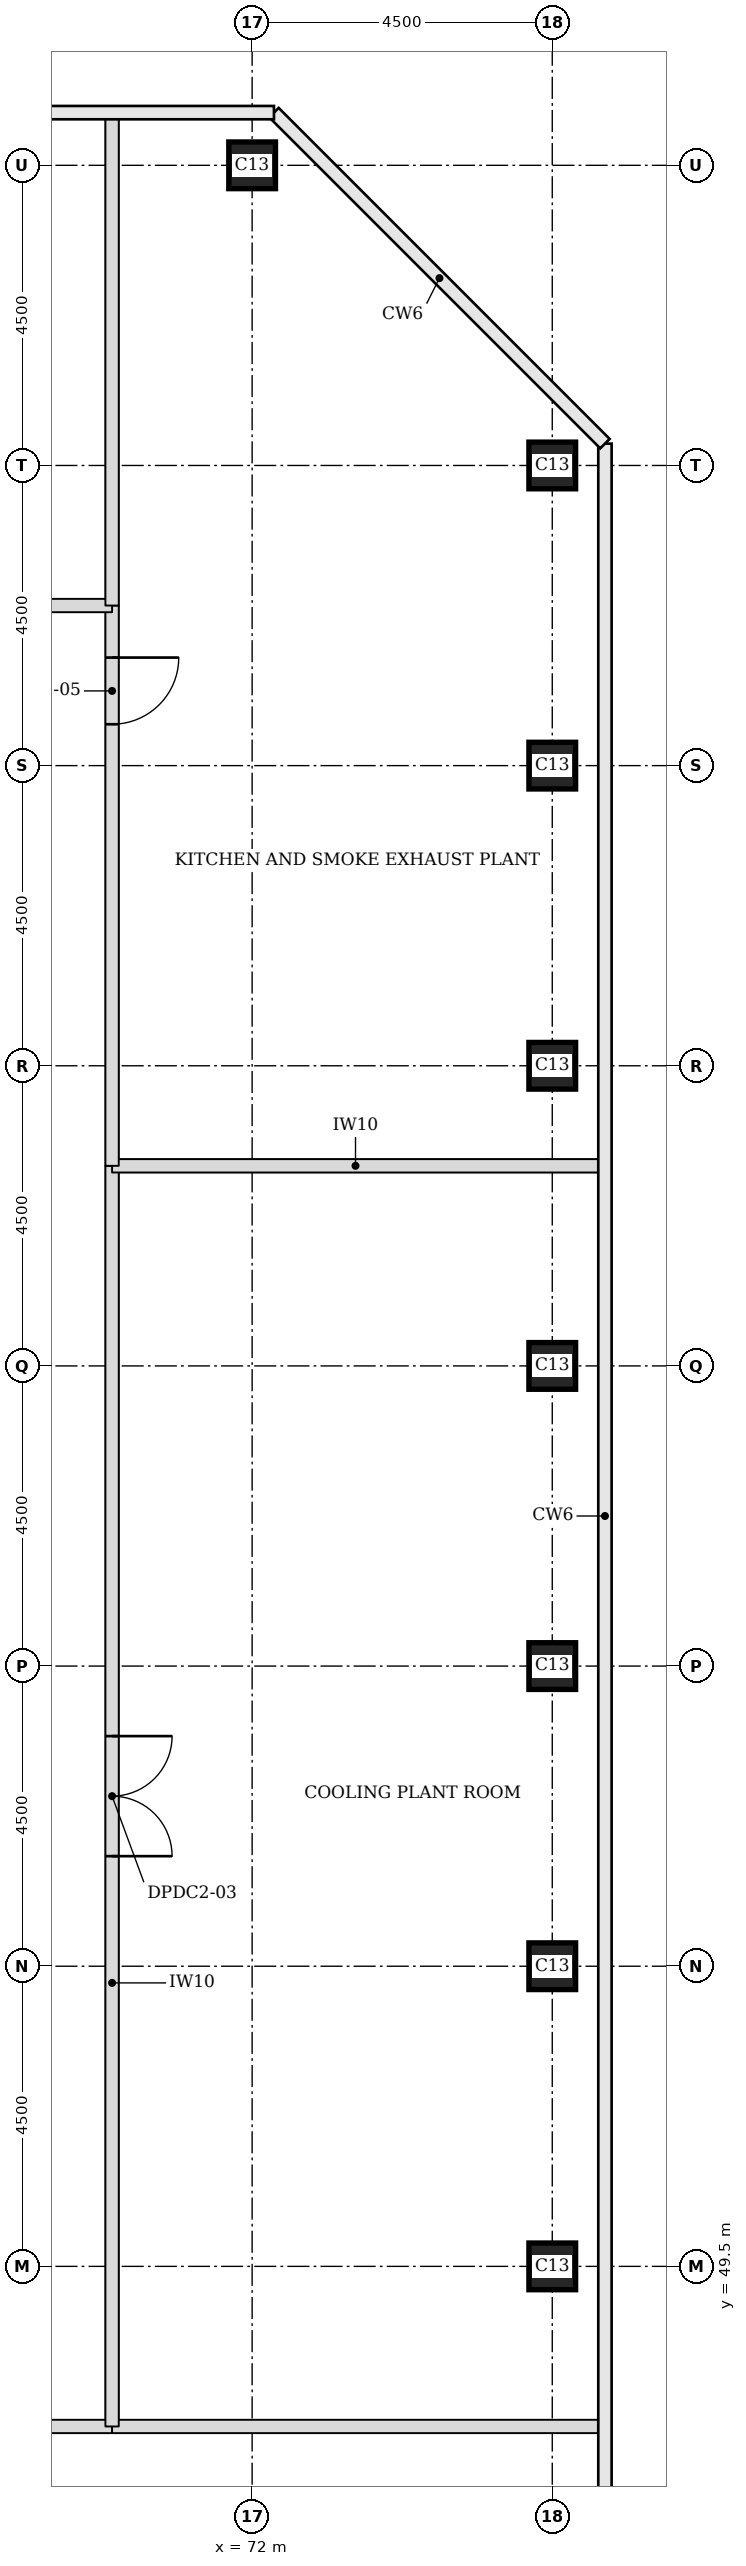
"""IFC4 building model, lengths in metres.
Left out: names, types, materials, properties, quantities, classifications, styles, units other than length and angle.
Written with IfcOpenShell. Run it as: python <this file> out.ifc"""

import sys

from ifc_helpers import new_model, si_unit, direction, frame, frame_2d, origin, origin_2d, place, context, subcontext, project, spatial, rectangle, extrude, element, fill, save


model = new_model("IFC4")
c1 = context("Model", 3, precision=1e-05, world=origin(), true_north=direction((0.0, 1.0)))
c2 = subcontext(c1, "Body", "Model", "MODEL_VIEW")
j1 = project(units=[si_unit("LENGTHUNIT", "METRE"), si_unit("PLANEANGLEUNIT", "RADIAN")], contexts=[c1])
p1 = place(None, origin())
s1 = spatial("IfcSite", under=j1, at=p1, CompositionType="ELEMENT")
p2 = place(p1, origin())
s2 = spatial("IfcBuilding", under=s1, at=p2, CompositionType="ELEMENT")
p3 = place(p2, frame((0.0, 0.0, 268.7)))
s3 = spatial("IfcBuildingStorey", under=s2, at=p3, CompositionType="ELEMENT", Elevation=268.7)
for number, where, z_axis, x_axis in (
    (1, (76.5, 49.5, 0.0), (0.0, 0.0, 1.0), (1.0, 0.0, 0.0)),
    (2, (76.5, 54.0, 0.0), (0.0, 0.0, 1.0), (1.0, 0.0, 0.0)),
    (3, (76.5, 58.5, 0.0), (0.0, 0.0, 1.0), (1.0, 0.0, 0.0)),
    (4, (76.5, 63.0, 0.0), (0.0, 0.0, 1.0), (1.0, 0.0, 0.0)),
    (5, (76.5, 67.5, 0.0), (0.0, 0.0, 1.0), (1.0, 0.0, 0.0)),
    (6, (76.5, 72.0, 0.0), (0.0, 0.0, 1.0), (1.0, 0.0, 0.0)),
    (7, (76.5, 76.5, 0.0), (0.0, 0.0, 1.0), (1.0, 0.0, 0.0)),
    (8, (72.0, 81.0, 0.0), (0.0, 0.0, 1.0), (1.0, 0.0, 0.0)),
):
    element("IfcColumn", number, at=place(p3, frame(where, z_axis=z_axis, x_axis=x_axis)), inside=s3, PredefinedType="COLUMN", context=c2, shape_type="SweptSolid", body=[
        extrude(rectangle(XDim=0.7, YDim=0.7, at=origin_2d()), origin(), (0.0, 0.0, 1.0), 5.0),
    ])
p4 = place(p3, frame((42.6, 47.1, 0.0), z_axis=(0.0, 0.0, 1.0), x_axis=(1.0, 0.0, 0.0)))
e9 = element("IfcWall", 9, at=p4, inside=s3, PredefinedType="PARTITIONING", context=c2, shape_type="SweptSolid", body=[
    extrude(rectangle(XDim=27.3, YDim=0.2, at=frame_2d((13.65, 0.0))), origin(), (0.0, 0.0, 1.0), 4.75),
])
p5 = place(p4, frame((12.75, 0.0, 0.0)))
e10 = element("IfcOpeningElement", 10, at=p5, cuts=e9, PredefinedType="OPENING", context=c2, shape_type="SweptSolid", body=[
    extrude(rectangle(XDim=1.8, YDim=2.1, at=frame_2d((0.9, 1.05))), frame((0.0, 0.11, 0.0), z_axis=(0.0, -1.0, 0.0), x_axis=(1.0, 0.0, 0.0)), (0.0, 0.0, 1.0), 0.22),
])
p6 = place(p3, frame((69.9, 47.1, 0.0), z_axis=(0.0, 0.0, 1.0), x_axis=(1.0, 0.0, 0.0)))
e11 = element("IfcWall", 11, at=p6, inside=s3, PredefinedType="PARTITIONING", context=c2, shape_type="SweptSolid", body=[
    extrude(rectangle(XDim=7.3, YDim=0.2, at=frame_2d((3.65, 0.0))), origin(), (0.0, 0.0, 1.0), 4.75),
])
p7 = place(p3, frame((69.9, 47.1, 0.0), z_axis=(0.0, 0.0, 1.0), x_axis=(0.0, 1.0, 0.0)))
e12 = element("IfcWall", 12, at=p7, inside=s3, PredefinedType="PARTITIONING", context=c2, shape_type="SweptSolid", body=[
    extrude(rectangle(XDim=18.9, YDim=0.2, at=frame_2d((9.45, 0.0))), origin(), (0.0, 0.0, 1.0), 4.75),
])
p8 = place(p7, frame((8.55, 0.0, 0.0)))
e13 = element("IfcOpeningElement", 13, at=p8, cuts=e12, PredefinedType="OPENING", context=c2, shape_type="SweptSolid", body=[
    extrude(rectangle(XDim=1.8, YDim=2.1, at=frame_2d((0.9, 1.05))), frame((0.0, 0.11, 0.0), z_axis=(0.0, -1.0, 0.0), x_axis=(1.0, 0.0, 0.0)), (0.0, 0.0, 1.0), 0.22),
])
p9 = place(p3, frame((69.9, 66.0, 0.0), z_axis=(0.0, 0.0, 1.0), x_axis=(1.0, 0.0, 0.0)))
e14 = element("IfcWall", 14, at=p9, inside=s3, PredefinedType="PARTITIONING", context=c2, shape_type="SweptSolid", body=[
    extrude(rectangle(XDim=7.3, YDim=0.2, at=frame_2d((3.65, 0.0))), origin(), (0.0, 0.0, 1.0), 4.75),
])
p10 = place(p3, frame((69.9, 66.0, 0.0), z_axis=(0.0, 0.0, 1.0), x_axis=(0.0, 1.0, 0.0)))
e15 = element("IfcWall", 15, at=p10, inside=s3, PredefinedType="PARTITIONING", context=c2, shape_type="SweptSolid", body=[
    extrude(rectangle(XDim=8.4, YDim=0.2, at=frame_2d((4.2, 0.0))), origin(), (0.0, 0.0, 1.0), 4.75),
])
p11 = place(p10, frame((6.62, 0.0, 0.0)))
e16 = element("IfcOpeningElement", 16, at=p11, cuts=e15, PredefinedType="OPENING", context=c2, shape_type="SweptSolid", body=[
    extrude(rectangle(XDim=1.0, YDim=2.1, at=frame_2d((0.5, 1.05))), frame((0.0, 0.11, 0.0), z_axis=(0.0, -1.0, 0.0), x_axis=(1.0, 0.0, 0.0)), (0.0, 0.0, 1.0), 0.22),
])
p12 = place(p3, frame((42.6, 74.4, 0.0), z_axis=(0.0, 0.0, 1.0), x_axis=(1.0, 0.0, 0.0)))
e17 = element("IfcWall", 17, at=p12, inside=s3, PredefinedType="PARTITIONING", context=c2, shape_type="SweptSolid", body=[
    extrude(rectangle(XDim=27.3, YDim=0.2, at=frame_2d((13.65, 0.0))), origin(), (0.0, 0.0, 1.0), 4.75),
])
p13 = place(p12, frame((12.75, 0.0, 0.0)))
e18 = element("IfcOpeningElement", 18, at=p13, cuts=e17, PredefinedType="OPENING", context=c2, shape_type="SweptSolid", body=[
    extrude(rectangle(XDim=1.8, YDim=2.1, at=frame_2d((0.9, 1.05))), frame((0.0, 0.11, 0.0), z_axis=(0.0, -1.0, 0.0), x_axis=(1.0, 0.0, 0.0)), (0.0, 0.0, 1.0), 0.22),
])
p14 = place(p3, frame((69.9, 74.4, 0.0), z_axis=(0.0, 0.0, 1.0), x_axis=(0.0, 1.0, 0.0)))
e19 = element("IfcWall", 19, at=p14, inside=s3, PredefinedType="PARTITIONING", context=c2, shape_type="SweptSolid", body=[
    extrude(rectangle(XDim=7.3, YDim=0.2, at=frame_2d((3.65, 0.0))), origin(), (0.0, 0.0, 1.0), 4.75),
])
p15 = place(p8, frame((1.8, 0.0, 0.0), z_axis=(0.0, 0.0, 1.0), x_axis=(-1.0, 0.0, 0.0)))
e20 = element("IfcDoor", 20, at=p15, inside=s3, OperationType="DOUBLE_DOOR_SINGLE_SWING", PredefinedType="DOOR", context=c2, shape_type="SweptSolid", body=[
    extrude(rectangle(XDim=1.8, YDim=2.1, at=frame_2d((0.9, 1.05))), frame((0.0, 0.025, 0.0), z_axis=(0.0, -1.0, 0.0), x_axis=(1.0, 0.0, 0.0)), (0.0, 0.0, 1.0), 0.05),
])
fill(e13, e20)
p16 = place(p11, frame((1.0, 0.0, 0.0), z_axis=(0.0, 0.0, 1.0), x_axis=(-1.0, 0.0, 0.0)))
e21 = element("IfcDoor", 21, at=p16, inside=s3, OperationType="SINGLE_SWING_LEFT", PredefinedType="DOOR", context=c2, shape_type="SweptSolid", body=[
    extrude(rectangle(XDim=1.0, YDim=2.1, at=frame_2d((0.5, 1.05))), frame((0.0, 0.025, 0.0), z_axis=(0.0, -1.0, 0.0), x_axis=(1.0, 0.0, 0.0)), (0.0, 0.0, 1.0), 0.05),
])
fill(e16, e21)
save(model, sys.argv[1])
